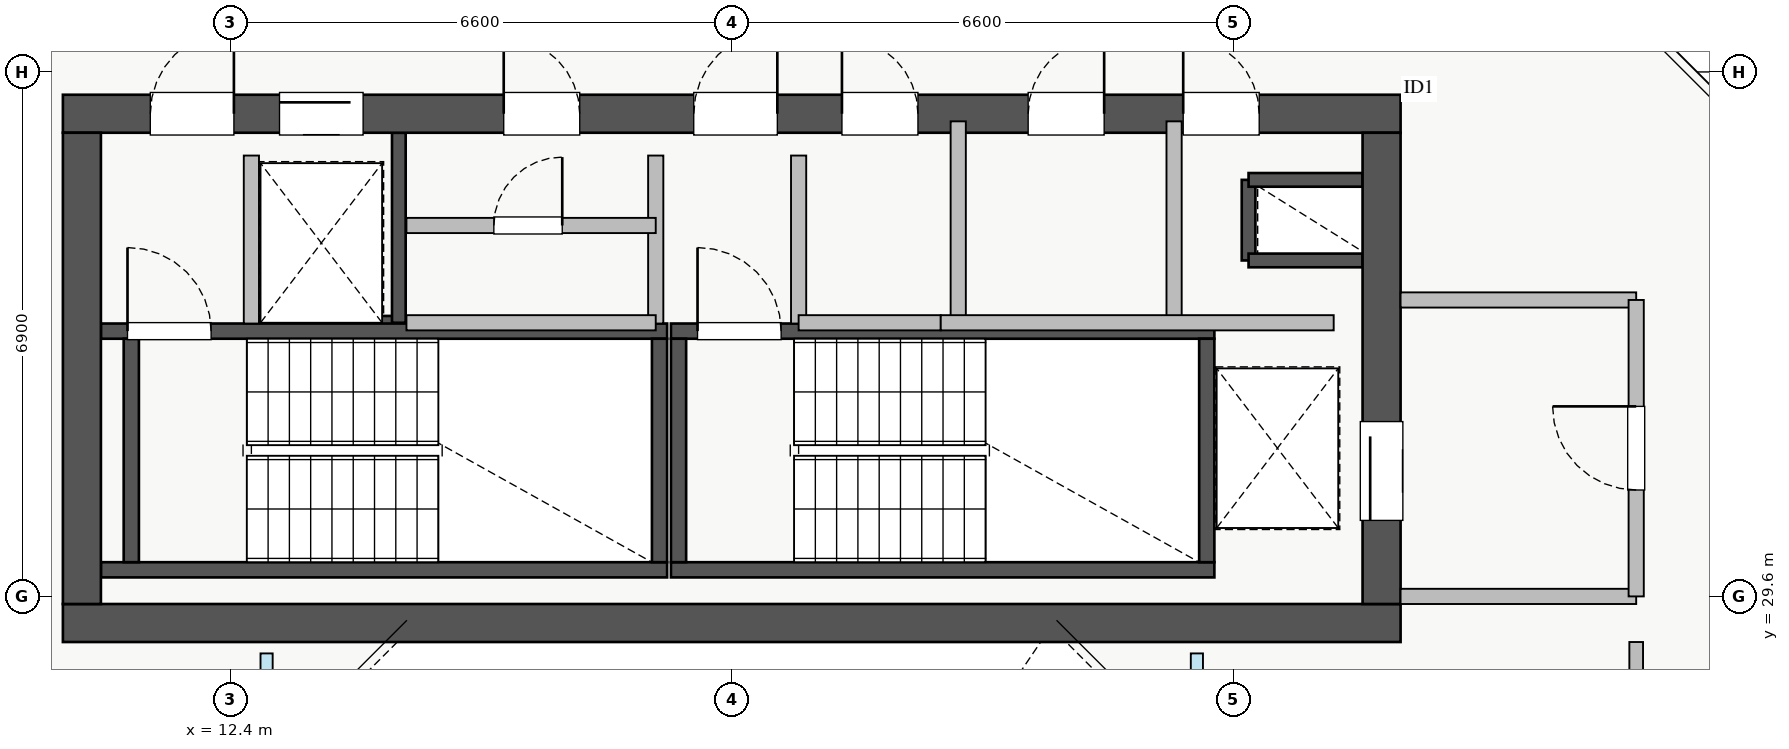
"""IFC4 building model, lengths in metres.
Left out: names, types, materials, properties, quantities, classifications, styles, units other than length and angle.
Written with IfcOpenShell. Run it as: python <this file> out.ifc"""

import sys

from ifc_helpers import new_model, si_unit, direction, frame, frame_2d, origin, place, context, subcontext, project, spatial, rectangle, extrude, source, transform, mapped, element, fill, save


model = new_model("IFC4")
c1 = context("Model", 3, precision=1e-05, world=origin(), true_north=direction((0.0, 1.0)))
c2 = subcontext(c1, "Body", "Model", "MODEL_VIEW")
j1 = project(units=[si_unit("LENGTHUNIT", "METRE"), si_unit("PLANEANGLEUNIT", "RADIAN")], contexts=[c1])
p1 = place(None, origin())
s1 = spatial("IfcSite", under=j1, at=p1, CompositionType="ELEMENT")
p2 = place(p1, origin())
s2 = spatial("IfcBuilding", under=s1, at=p2, CompositionType="ELEMENT")
p3 = place(p2, frame((0.0, 0.0, 229.5)))
s3 = spatial("IfcBuildingStorey", under=s2, at=p3, CompositionType="ELEMENT", Elevation=229.5)
p4 = place(p3, frame((12.68, 33.2, 0.0), z_axis=(0.0, 0.0, 1.0), x_axis=(1.0, 0.0, 0.0)))
e1 = element("IfcWall", 1, at=p4, inside=s3, PredefinedType="SHEAR", context=c2, shape_type="SweptSolid", body=[
    extrude(rectangle(XDim=1.94, YDim=0.18, at=frame_2d((0.97, 0.0))), origin(), (0.0, 0.0, 1.0), 3.03),
])
p5 = place(p3, frame((14.62, 33.2, 0.0), z_axis=(0.0, 0.0, 1.0), x_axis=(0.0, 1.0, 0.0)))
e2 = element("IfcWall", 2, at=p5, inside=s3, PredefinedType="SHEAR", context=c2, shape_type="SweptSolid", body=[
    extrude(rectangle(XDim=2.5, YDim=0.18, at=frame_2d((1.25, 0.0))), origin(), (0.0, 0.0, 1.0), 3.03),
])
p6 = place(p3, frame((25.8, 34.02, 0.0), z_axis=(0.0, 0.0, 1.0), x_axis=(0.0, 1.0, 0.0)))
e3 = element("IfcWall", 3, at=p6, inside=s3, PredefinedType="SHEAR", context=c2, shape_type="SweptSolid", body=[
    extrude(rectangle(XDim=1.06, YDim=0.18, at=frame_2d((0.53, 0.0))), origin(), (0.0, 0.0, 1.0), 3.03),
])
for number, where, z_axis, x_axis in (
    (4, (25.8, 35.08, 0.0), (0.0, 0.0, 1.0), (1.0, 0.0, 0.0)),
    (5, (25.8, 34.02, 0.0), (0.0, 0.0, 1.0), (1.0, 0.0, 0.0)),
):
    element("IfcWall", number, at=place(p3, frame(where, z_axis=z_axis, x_axis=x_axis)), inside=s3, PredefinedType="SHEAR", context=c2, shape_type="SweptSolid", body=[
        extrude(rectangle(XDim=1.5, YDim=0.18, at=frame_2d((0.75, 0.0))), origin(), (0.0, 0.0, 1.0), 3.03),
    ])
p7 = place(p3, frame((10.7, 29.95, 0.0), z_axis=(0.0, 0.0, 1.0), x_axis=(1.0, 0.0, 0.0)))
e6 = element("IfcWall", 6, at=p7, inside=s3, PredefinedType="SHEAR", context=c2, shape_type="SweptSolid", body=[
    extrude(rectangle(XDim=7.45, YDim=0.2, at=frame_2d((3.725, 0.0))), origin(), (0.0, 0.0, 1.0), 3.25),
])
p8 = place(p3, frame((10.7, 33.09, 0.0), z_axis=(0.0, 0.0, 1.0), x_axis=(1.0, 0.0, 0.0)))
e7 = element("IfcWall", 7, at=p8, inside=s3, PredefinedType="SHEAR", context=c2, shape_type="SweptSolid", body=[
    extrude(rectangle(XDim=7.45, YDim=0.2, at=frame_2d((3.725, 0.0))), origin(), (0.0, 0.0, 1.0), 3.25),
])
p9 = place(p8, frame((0.35, 0.0, 0.0)))
e8 = element("IfcOpeningElement", 8, at=p9, cuts=e7, PredefinedType="OPENING", context=c2, shape_type="SweptSolid", body=[
    extrude(rectangle(XDim=1.1, YDim=2.05, at=frame_2d((0.55, 1.025))), frame((0.0, 0.11, 0.0), z_axis=(0.0, -1.0, 0.0), x_axis=(1.0, 0.0, 0.0)), (0.0, 0.0, 1.0), 0.22),
])
for number, where, z_axis, x_axis in (
    (9, (11.1, 30.05, 0.0), (0.0, 0.0, 1.0), (0.0, 1.0, 0.0)),
    (10, (18.05, 30.05, 0.0), (0.0, 0.0, 1.0), (0.0, 1.0, 0.0)),
):
    element("IfcWall", number, at=place(p3, frame(where, z_axis=z_axis, x_axis=x_axis)), inside=s3, PredefinedType="SHEAR", context=c2, shape_type="SweptSolid", body=[
        extrude(rectangle(XDim=2.94, YDim=0.2, at=frame_2d((1.47, 0.0))), origin(), (0.0, 0.0, 1.0), 3.25),
    ])
p10 = place(p3, frame((18.2, 29.95, 0.0), z_axis=(0.0, 0.0, 1.0), x_axis=(1.0, 0.0, 0.0)))
e11 = element("IfcWall", 11, at=p10, inside=s3, PredefinedType="SHEAR", context=c2, shape_type="SweptSolid", body=[
    extrude(rectangle(XDim=7.15, YDim=0.2, at=frame_2d((3.575, 0.0))), origin(), (0.0, 0.0, 1.0), 3.25),
])
p11 = place(p3, frame((18.2, 33.09, 0.0), z_axis=(0.0, 0.0, 1.0), x_axis=(1.0, 0.0, 0.0)))
e12 = element("IfcWall", 12, at=p11, inside=s3, PredefinedType="SHEAR", context=c2, shape_type="SweptSolid", body=[
    extrude(rectangle(XDim=7.15, YDim=0.2, at=frame_2d((3.575, 0.0))), origin(), (0.0, 0.0, 1.0), 3.25),
])
p12 = place(p11, frame((0.35, 0.0, 0.0)))
e13 = element("IfcOpeningElement", 13, at=p12, cuts=e12, PredefinedType="OPENING", context=c2, shape_type="SweptSolid", body=[
    extrude(rectangle(XDim=1.1, YDim=2.05, at=frame_2d((0.55, 1.025))), frame((0.0, 0.11, 0.0), z_axis=(0.0, -1.0, 0.0), x_axis=(1.0, 0.0, 0.0)), (0.0, 0.0, 1.0), 0.22),
])
for number, where, z_axis, x_axis in (
    (14, (18.3, 30.05, 0.0), (0.0, 0.0, 1.0), (0.0, 1.0, 0.0)),
    (15, (25.25, 30.05, 0.0), (0.0, 0.0, 1.0), (0.0, 1.0, 0.0)),
):
    element("IfcWall", number, at=place(p3, frame(where, z_axis=z_axis, x_axis=x_axis)), inside=s3, PredefinedType="SHEAR", context=c2, shape_type="SweptSolid", body=[
        extrude(rectangle(XDim=2.94, YDim=0.2, at=frame_2d((1.47, 0.0))), origin(), (0.0, 0.0, 1.0), 3.25),
    ])
p13 = place(p3, frame((10.2, 29.25, 0.0), z_axis=(0.0, 0.0, 1.0), x_axis=(1.0, 0.0, 0.0)))
e16 = element("IfcWall", 16, at=p13, inside=s3, PredefinedType="SHEAR", context=c2, shape_type="SweptSolid", body=[
    extrude(rectangle(XDim=17.6, YDim=0.5, at=frame_2d((8.8, 0.0))), origin(), (0.0, 0.0, 1.0), 3.25),
])
p14 = place(p3, frame((10.2, 35.95, 0.0), z_axis=(0.0, 0.0, 1.0), x_axis=(1.0, 0.0, 0.0)))
e17 = element("IfcWall", 17, at=p14, inside=s3, PredefinedType="SHEAR", context=c2, shape_type="SweptSolid", body=[
    extrude(rectangle(XDim=17.6, YDim=0.5, at=frame_2d((8.8, 0.0))), origin(), (0.0, 0.0, 1.0), 3.25),
])
p15 = place(p14, frame((1.15, 0.0, 0.0)))
e18 = element("IfcOpeningElement", 18, at=p15, cuts=e17, PredefinedType="OPENING", context=c2, shape_type="SweptSolid", body=[
    extrude(rectangle(XDim=1.1, YDim=2.05, at=frame_2d((0.55, 1.025))), frame((0.0, 0.26, 0.0), z_axis=(0.0, -1.0, 0.0), x_axis=(1.0, 0.0, 0.0)), (0.0, 0.0, 1.0), 0.52),
])
p16 = place(p14, frame((8.3, 0.0, 0.0)))
e19 = element("IfcOpeningElement", 19, at=p16, cuts=e17, PredefinedType="OPENING", context=c2, shape_type="SweptSolid", body=[
    extrude(rectangle(XDim=1.1, YDim=2.05, at=frame_2d((0.55, 1.025))), frame((0.0, 0.26, 0.0), z_axis=(0.0, -1.0, 0.0), x_axis=(1.0, 0.0, 0.0)), (0.0, 0.0, 1.0), 0.52),
])
p17 = place(p14, frame((2.85, 0.0, 0.0)))
e20 = element("IfcOpeningElement", 20, at=p17, cuts=e17, PredefinedType="OPENING", context=c2, shape_type="SweptSolid", body=[
    extrude(rectangle(XDim=1.1, YDim=2.05, at=frame_2d((0.55, 1.025))), frame((0.0, 0.26, 0.0), z_axis=(0.0, -1.0, 0.0), x_axis=(1.0, 0.0, 0.0)), (0.0, 0.0, 1.0), 0.52),
])
p18 = place(p14, frame((5.8, 0.0, 0.0)))
e21 = element("IfcOpeningElement", 21, at=p18, cuts=e17, PredefinedType="OPENING", context=c2, shape_type="SweptSolid", body=[
    extrude(rectangle(XDim=1.0, YDim=2.05, at=frame_2d((0.5, 1.025))), frame((0.0, 0.26, 0.0), z_axis=(0.0, -1.0, 0.0), x_axis=(1.0, 0.0, 0.0)), (0.0, 0.0, 1.0), 0.52),
])
p19 = place(p14, frame((14.74, 0.0, 0.0)))
e22 = element("IfcOpeningElement", 22, at=p19, cuts=e17, PredefinedType="OPENING", context=c2, shape_type="SweptSolid", body=[
    extrude(rectangle(XDim=1.0, YDim=2.05, at=frame_2d((0.5, 1.025))), frame((0.0, 0.26, 0.0), z_axis=(0.0, -1.0, 0.0), x_axis=(1.0, 0.0, 0.0)), (0.0, 0.0, 1.0), 0.52),
])
p20 = place(p14, frame((10.25, 0.0, 0.0)))
e23 = element("IfcOpeningElement", 23, at=p20, cuts=e17, PredefinedType="OPENING", context=c2, shape_type="SweptSolid", body=[
    extrude(rectangle(XDim=1.0, YDim=2.05, at=frame_2d((0.5, 1.025))), frame((0.0, 0.26, 0.0), z_axis=(0.0, -1.0, 0.0), x_axis=(1.0, 0.0, 0.0)), (0.0, 0.0, 1.0), 0.52),
])
p21 = place(p14, frame((12.7, 0.0, 0.0)))
e24 = element("IfcOpeningElement", 24, at=p21, cuts=e17, PredefinedType="OPENING", context=c2, shape_type="SweptSolid", body=[
    extrude(rectangle(XDim=1.0, YDim=2.05, at=frame_2d((0.5, 1.025))), frame((0.0, 0.26, 0.0), z_axis=(0.0, -1.0, 0.0), x_axis=(1.0, 0.0, 0.0)), (0.0, 0.0, 1.0), 0.52),
])
p22 = place(p3, frame((10.45, 29.5, 0.0), z_axis=(0.0, 0.0, 1.0), x_axis=(0.0, 1.0, 0.0)))
e25 = element("IfcWall", 25, at=p22, inside=s3, PredefinedType="SHEAR", context=c2, shape_type="SweptSolid", body=[
    extrude(rectangle(XDim=6.2, YDim=0.5, at=frame_2d((3.1, 0.0))), origin(), (0.0, 0.0, 1.0), 3.25),
])
p23 = place(p3, frame((27.55, 29.5, 0.0), z_axis=(0.0, 0.0, 1.0), x_axis=(0.0, 1.0, 0.0)))
e26 = element("IfcWall", 26, at=p23, inside=s3, PredefinedType="SHEAR", context=c2, shape_type="SweptSolid", body=[
    extrude(rectangle(XDim=6.2, YDim=0.5, at=frame_2d((3.1, 0.0))), origin(), (0.0, 0.0, 1.0), 3.25),
])
p24 = place(p23, frame((1.1, 0.0, 0.0)))
e27 = element("IfcOpeningElement", 27, at=p24, cuts=e26, PredefinedType="OPENING", context=c2, shape_type="SweptSolid", body=[
    extrude(rectangle(XDim=1.3, YDim=2.05, at=frame_2d((0.65, 1.025))), frame((0.0, 0.26, 0.0), z_axis=(0.0, -1.0, 0.0), x_axis=(1.0, 0.0, 0.0)), (0.0, 0.0, 1.0), 0.52),
])
p25 = place(p3, frame((27.8, 29.6, 0.0), z_axis=(0.0, 0.0, 1.0), x_axis=(1.0, 0.0, 0.0)))
e28 = element("IfcWall", 28, at=p25, inside=s3, PredefinedType="PARTITIONING", context=c2, shape_type="SweptSolid", body=[
    extrude(rectangle(XDim=3.1, YDim=0.2, at=frame_2d((1.55, 0.0))), origin(), (0.0, 0.0, 1.0), 3.03),
])
p26 = place(p3, frame((27.8, 33.5, 0.0), z_axis=(0.0, 0.0, 1.0), x_axis=(1.0, 0.0, 0.0)))
e29 = element("IfcWall", 29, at=p26, inside=s3, PredefinedType="PARTITIONING", context=c2, shape_type="SweptSolid", body=[
    extrude(rectangle(XDim=3.1, YDim=0.2, at=frame_2d((1.55, 0.0))), origin(), (0.0, 0.0, 1.0), 2.225),
])
p27 = place(p3, frame((30.9, 29.6, 0.0), z_axis=(0.0, 0.0, 1.0), x_axis=(0.0, 1.0, 0.0)))
e30 = element("IfcWall", 30, at=p27, inside=s3, PredefinedType="PARTITIONING", context=c2, shape_type="SweptSolid", body=[
    extrude(rectangle(XDim=3.9, YDim=0.2, at=frame_2d((1.95, 0.0))), origin(), (0.0, 0.0, 1.0), 3.03),
])
p28 = place(p27, frame((1.4, 0.0, 0.0)))
e31 = element("IfcOpeningElement", 31, at=p28, cuts=e30, PredefinedType="OPENING", context=c2, shape_type="SweptSolid", body=[
    extrude(rectangle(XDim=1.1, YDim=2.05, at=frame_2d((0.55, 1.025))), frame((0.0, 0.11, 0.0), z_axis=(0.0, -1.0, 0.0), x_axis=(1.0, 0.0, 0.0)), (0.0, 0.0, 1.0), 0.22),
])
for number, where, z_axis, x_axis in (
    (32, (12.68, 33.19, 0.0), (0.0, 0.0, 1.0), (0.0, 1.0, 0.0)),
    (33, (18.0, 33.19, 0.0), (0.0, 0.0, 1.0), (0.0, 1.0, 0.0)),
    (34, (19.88, 33.19, 0.0), (0.0, 0.0, 1.0), (0.0, 1.0, 0.0)),
):
    element("IfcWall", number, at=place(p3, frame(where, z_axis=z_axis, x_axis=x_axis)), inside=s3, PredefinedType="PARTITIONING", context=c2, shape_type="SweptSolid", body=[
        extrude(rectangle(XDim=2.21, YDim=0.2, at=frame_2d((1.105, 0.0))), origin(), (0.0, 0.0, 1.0), 3.03),
    ])
p29 = place(p3, frame((14.72, 34.48, 0.0), z_axis=(0.0, 0.0, 1.0), x_axis=(1.0, 0.0, 0.0)))
e35 = element("IfcWall", 35, at=p29, inside=s3, PredefinedType="PARTITIONING", context=c2, shape_type="SweptSolid", body=[
    extrude(rectangle(XDim=3.28, YDim=0.2, at=frame_2d((1.64, 0.0))), origin(), (0.0, 0.0, 1.0), 3.03),
])
p30 = place(p29, frame((1.15, 0.0, 0.0)))
e36 = element("IfcOpeningElement", 36, at=p30, cuts=e35, PredefinedType="OPENING", context=c2, shape_type="SweptSolid", body=[
    extrude(rectangle(XDim=0.9, YDim=2.05, at=frame_2d((0.45, 1.025))), frame((0.0, 0.11, 0.0), z_axis=(0.0, -1.0, 0.0), x_axis=(1.0, 0.0, 0.0)), (0.0, 0.0, 1.0), 0.22),
])
p31 = place(p3, frame((14.72, 33.2, 0.0), z_axis=(0.0, 0.0, 1.0), x_axis=(1.0, 0.0, 0.0)))
e37 = element("IfcWall", 37, at=p31, inside=s3, PredefinedType="PARTITIONING", context=c2, shape_type="SweptSolid", body=[
    extrude(rectangle(XDim=3.28, YDim=0.2, at=frame_2d((1.64, 0.0))), origin(), (0.0, 0.0, 1.0), 3.03),
])
p32 = place(p3, frame((24.82, 33.2, 0.0), z_axis=(0.0, 0.0, 1.0), x_axis=(0.0, 1.0, 0.0)))
e38 = element("IfcWall", 38, at=p32, inside=s3, PredefinedType="PARTITIONING", context=c2, shape_type="SweptSolid", body=[
    extrude(rectangle(XDim=2.65, YDim=0.2, at=frame_2d((1.325, 0.0))), origin(), (0.0, 0.0, 1.0), 3.03),
])
p33 = place(p3, frame((19.88, 33.2, 0.0), z_axis=(0.0, 0.0, 1.0), x_axis=(1.0, 0.0, 0.0)))
e39 = element("IfcWall", 39, at=p33, inside=s3, PredefinedType="PARTITIONING", context=c2, shape_type="SweptSolid", body=[
    extrude(rectangle(XDim=1.87, YDim=0.2, at=frame_2d((0.935, 0.0))), origin(), (0.0, 0.0, 1.0), 3.03),
])
p34 = place(p3, frame((21.98, 33.2, 0.0), z_axis=(0.0, 0.0, 1.0), x_axis=(0.0, 1.0, 0.0)))
e40 = element("IfcWall", 40, at=p34, inside=s3, PredefinedType="PARTITIONING", context=c2, shape_type="SweptSolid", body=[
    extrude(rectangle(XDim=2.65, YDim=0.2, at=frame_2d((1.325, 0.0))), origin(), (0.0, 0.0, 1.0), 3.03),
])
p35 = place(p3, frame((21.75, 33.2, 0.0), z_axis=(0.0, 0.0, 1.0), x_axis=(1.0, 0.0, 0.0)))
e41 = element("IfcWall", 41, at=p35, inside=s3, PredefinedType="PARTITIONING", context=c2, shape_type="SweptSolid", body=[
    extrude(rectangle(XDim=5.17, YDim=0.2, at=frame_2d((2.585, 0.0))), origin(), (0.0, 0.0, 1.0), 3.03),
])
p36 = place(p3, frame((30.9, 17.0, 0.0), z_axis=(0.0, 0.0, 1.0), x_axis=(0.0, 1.0, 0.0)))
e42 = element("IfcWall", 42, at=p36, inside=s3, PredefinedType="PARTITIONING", context=c2, shape_type="SweptSolid", body=[
    extrude(rectangle(XDim=12.0, YDim=0.18, at=frame_2d((6.0, 0.0))), origin(), (0.0, 0.0, 1.0), 3.03),
])
p37 = place(p36, frame((2.5, 0.0, 0.0)))
e43 = element("IfcOpeningElement", 43, at=p37, cuts=e42, PredefinedType="OPENING", context=c2, shape_type="SweptSolid", body=[
    extrude(rectangle(XDim=1.0, YDim=2.05, at=frame_2d((0.5, 1.025))), frame((0.0, 0.1, 0.0), z_axis=(0.0, -1.0, 0.0), x_axis=(1.0, 0.0, 0.0)), (0.0, 0.0, 1.0), 0.2),
])
p38 = place(p36, frame((8.5, 0.0, 0.0)))
e44 = element("IfcOpeningElement", 44, at=p38, cuts=e42, PredefinedType="OPENING", context=c2, shape_type="SweptSolid", body=[
    extrude(rectangle(XDim=1.0, YDim=2.05, at=frame_2d((0.5, 1.025))), frame((0.0, 0.1, 0.0), z_axis=(0.0, -1.0, 0.0), x_axis=(1.0, 0.0, 0.0)), (0.0, 0.0, 1.0), 0.2),
])
m1 = source(origin(), c2, "Body", "SweptSolid", [
    extrude(rectangle(XDim=1.3, YDim=2.05, at=frame_2d((0.65, 1.025))), frame((0.0, 0.025, 0.0), z_axis=(0.0, -1.0, 0.0), x_axis=(1.0, 0.0, 0.0)), (0.0, 0.0, 1.0), 0.05),
])
p39 = place(p24, origin())
e45 = element("IfcDoor", 45, at=p39, inside=s3, OperationType="SLIDING_TO_LEFT", PredefinedType="DOOR", context=c2, shape_type="MappedRepresentation", body=[
    mapped(m1, transform((0.0, 0.0, 0.0), x_axis=(1.0, 0.0, 0.0), y_axis=(0.0, 1.0, 0.0), z_axis=(0.0, 0.0, 1.0), scale=1.0)),
])
fill(e27, e45)
m2 = source(origin(), c2, "Body", "SweptSolid", [
    extrude(rectangle(XDim=1.1, YDim=2.05, at=frame_2d((0.55, 1.025))), frame((0.0, 0.025, 0.0), z_axis=(0.0, -1.0, 0.0), x_axis=(1.0, 0.0, 0.0)), (0.0, 0.0, 1.0), 0.05),
])
p40 = place(p15, origin())
e46 = element("IfcDoor", 46, at=p40, inside=s3, OperationType="SINGLE_SWING_RIGHT", PredefinedType="DOOR", context=c2, shape_type="MappedRepresentation", body=[
    mapped(m2, transform((0.0, 0.0, 0.0), x_axis=(1.0, 0.0, 0.0), y_axis=(0.0, 1.0, 0.0), z_axis=(0.0, 0.0, 1.0), scale=1.0)),
])
fill(e18, e46)
p41 = place(p9, origin())
e47 = element("IfcDoor", 47, at=p41, inside=s3, OperationType="SINGLE_SWING_LEFT", PredefinedType="DOOR", context=c2, shape_type="MappedRepresentation", body=[
    mapped(m2, transform((0.0, 0.0, 0.0), x_axis=(1.0, 0.0, 0.0), y_axis=(0.0, 1.0, 0.0), z_axis=(0.0, 0.0, 1.0), scale=1.0)),
])
fill(e8, e47)
p42 = place(p16, origin())
e48 = element("IfcDoor", 48, at=p42, inside=s3, OperationType="SINGLE_SWING_RIGHT", PredefinedType="DOOR", context=c2, shape_type="MappedRepresentation", body=[
    mapped(m2, transform((0.0, 0.0, 0.0), x_axis=(1.0, 0.0, 0.0), y_axis=(0.0, 1.0, 0.0), z_axis=(0.0, 0.0, 1.0), scale=1.0)),
])
fill(e19, e48)
p43 = place(p12, origin())
e49 = element("IfcDoor", 49, at=p43, inside=s3, OperationType="SINGLE_SWING_LEFT", PredefinedType="DOOR", context=c2, shape_type="MappedRepresentation", body=[
    mapped(m2, transform((0.0, 0.0, 0.0), x_axis=(1.0, 0.0, 0.0), y_axis=(0.0, 1.0, 0.0), z_axis=(0.0, 0.0, 1.0), scale=1.0)),
])
fill(e13, e49)
p44 = place(p17, origin())
e50 = element("IfcDoor", 50, at=p44, inside=s3, OperationType="SLIDING_TO_LEFT", PredefinedType="DOOR", context=c2, shape_type="MappedRepresentation", body=[
    mapped(m2, transform((0.0, 0.0, 0.0), x_axis=(1.0, 0.0, 0.0), y_axis=(0.0, 1.0, 0.0), z_axis=(0.0, 0.0, 1.0), scale=1.0)),
])
fill(e20, e50)
m3 = source(origin(), c2, "Body", "SweptSolid", [
    extrude(rectangle(XDim=1.0, YDim=2.05, at=frame_2d((0.5, 1.025))), frame((0.0, 0.025, 0.0), z_axis=(0.0, -1.0, 0.0), x_axis=(1.0, 0.0, 0.0)), (0.0, 0.0, 1.0), 0.05),
])
p45 = place(p18, origin())
e51 = element("IfcDoor", 51, at=p45, inside=s3, OperationType="SINGLE_SWING_LEFT", PredefinedType="DOOR", context=c2, shape_type="MappedRepresentation", body=[
    mapped(m3, transform((0.0, 0.0, 0.0), x_axis=(1.0, 0.0, 0.0), y_axis=(0.0, 1.0, 0.0), z_axis=(0.0, 0.0, 1.0), scale=1.0)),
])
fill(e21, e51)
p46 = place(p19, origin())
e52 = element("IfcDoor", 52, at=p46, inside=s3, OperationType="SINGLE_SWING_LEFT", PredefinedType="DOOR", context=c2, shape_type="MappedRepresentation", body=[
    mapped(m3, transform((0.0, 0.0, 0.0), x_axis=(1.0, 0.0, 0.0), y_axis=(0.0, 1.0, 0.0), z_axis=(0.0, 0.0, 1.0), scale=1.0)),
])
fill(e22, e52)
p47 = place(p20, origin())
e53 = element("IfcDoor", 53, at=p47, inside=s3, OperationType="SINGLE_SWING_LEFT", PredefinedType="DOOR", context=c2, shape_type="MappedRepresentation", body=[
    mapped(m3, transform((0.0, 0.0, 0.0), x_axis=(1.0, 0.0, 0.0), y_axis=(0.0, 1.0, 0.0), z_axis=(0.0, 0.0, 1.0), scale=1.0)),
])
fill(e23, e53)
p48 = place(p21, origin())
e54 = element("IfcDoor", 54, at=p48, inside=s3, OperationType="SINGLE_SWING_RIGHT", PredefinedType="DOOR", context=c2, shape_type="MappedRepresentation", body=[
    mapped(m3, transform((0.0, 0.0, 0.0), x_axis=(1.0, 0.0, 0.0), y_axis=(0.0, 1.0, 0.0), z_axis=(0.0, 0.0, 1.0), scale=1.0)),
])
fill(e24, e54)
p49 = place(p28, origin())
e55 = element("IfcDoor", 55, at=p49, inside=s3, OperationType="SINGLE_SWING_RIGHT", PredefinedType="DOOR", context=c2, shape_type="MappedRepresentation", body=[
    mapped(m2, transform((0.0, 0.0, 0.0), x_axis=(1.0, 0.0, 0.0), y_axis=(0.0, 1.0, 0.0), z_axis=(0.0, 0.0, 1.0), scale=1.0)),
])
fill(e31, e55)
m4 = source(origin(), c2, "Body", "SweptSolid", [
    extrude(rectangle(XDim=0.9, YDim=2.05, at=frame_2d((0.45, 1.025))), frame((0.0, 0.025, 0.0), z_axis=(0.0, -1.0, 0.0), x_axis=(1.0, 0.0, 0.0)), (0.0, 0.0, 1.0), 0.05),
])
p50 = place(p30, origin())
e56 = element("IfcDoor", 56, at=p50, inside=s3, OperationType="SINGLE_SWING_RIGHT", PredefinedType="DOOR", context=c2, shape_type="MappedRepresentation", body=[
    mapped(m4, transform((0.0, 0.0, 0.0), x_axis=(1.0, 0.0, 0.0), y_axis=(0.0, 1.0, 0.0), z_axis=(0.0, 0.0, 1.0), scale=1.0)),
])
fill(e36, e56)
save(model, sys.argv[1])
